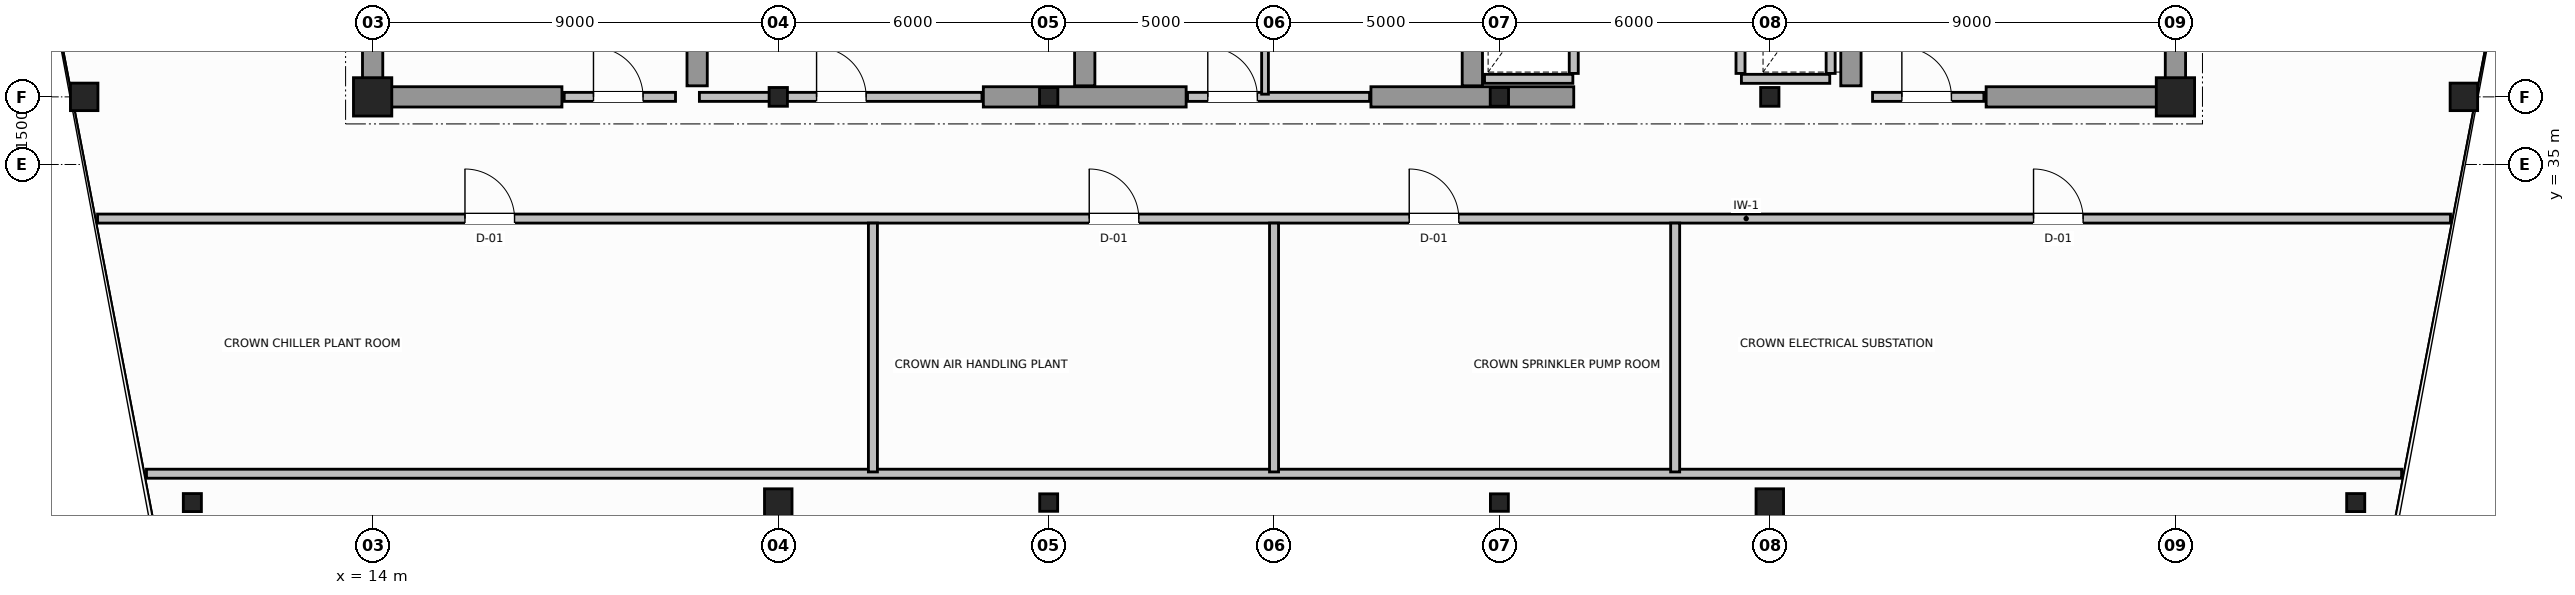
"""IFC4 building model, lengths in metres.
Left out: names, types, materials, properties, quantities, classifications, styles, units other than length and angle.
Written with IfcOpenShell. Run it as: python <this file> out.ifc"""

import sys

from ifc_helpers import new_model, si_unit, direction, frame, frame_2d, origin, origin_2d, place, context, subcontext, project, spatial, rectangle, hollow_circle, i_section, extrude, source, transform, mapped, element, fill, save


model = new_model("IFC4")
c1 = context("Model", 3, precision=1e-05, world=origin(), true_north=direction((0.0, 1.0)))
c2 = subcontext(c1, "Body", "Model", "MODEL_VIEW")
j1 = project(units=[si_unit("LENGTHUNIT", "METRE"), si_unit("PLANEANGLEUNIT", "RADIAN")], contexts=[c1])
p1 = place(None, origin())
s1 = spatial("IfcSite", under=j1, at=p1, CompositionType="ELEMENT")
p2 = place(p1, origin())
s2 = spatial("IfcBuilding", under=s1, at=p2, CompositionType="ELEMENT")
p3 = place(p2, frame((0.0, 0.0, 303.8)))
s3 = spatial("IfcBuildingStorey", under=s2, at=p3, CompositionType="ELEMENT", Elevation=303.8)
m1 = source(origin(), c2, "Body", "SweptSolid", [
    extrude(rectangle(XDim=0.85, YDim=0.85, at=origin_2d()), origin(), (0.0, 0.0, 1.0), 4.6),
])
p4 = place(p3, frame((14.0, 36.5, 0.0), z_axis=(0.0, 0.0, 1.0), x_axis=(1.0, 0.0, 0.0)))
e1 = element("IfcColumn", 1, at=p4, inside=s3, PredefinedType="COLUMN", context=c2, shape_type="MappedRepresentation", body=[
    mapped(m1, transform((0.0, 0.0, 0.0), scale=1.0)),
])
m2 = source(origin(), c2, "Body", "SweptSolid", [
    extrude(i_section(OverallWidth=0.406, OverallDepth=0.416, WebThickness=0.03, FlangeThickness=0.042, FilletRadius=0.015, at=origin_2d()), origin(), (0.0, 0.0, 1.0), 4.6),
])
for number, where, z_axis, x_axis in (
    (2, (23.0, 36.5, 0.0), (0.0, 0.0, 1.0), (1.0, 0.0, 0.0)),
    (3, (29.0, 36.5, 0.0), (0.0, 0.0, 1.0), (1.0, 0.0, 0.0)),
    (4, (39.0, 36.5, 0.0), (0.0, 0.0, 1.0), (1.0, 0.0, 0.0)),
    (5, (45.0, 36.5, 0.0), (0.0, 0.0, 1.0), (1.0, 0.0, 0.0)),
):
    element("IfcColumn", number, at=place(p3, frame(where, z_axis=z_axis, x_axis=x_axis)), inside=s3, PredefinedType="COLUMN", context=c2, shape_type="MappedRepresentation", body=[
        mapped(m2, transform((0.0, 0.0, 0.0), scale=1.0)),
    ])
p5 = place(p3, frame((54.0, 36.5, 0.0), z_axis=(0.0, 0.0, 1.0), x_axis=(1.0, 0.0, 0.0)))
e6 = element("IfcColumn", 6, at=p5, inside=s3, PredefinedType="COLUMN", context=c2, shape_type="MappedRepresentation", body=[
    mapped(m1, transform((0.0, 0.0, 0.0), scale=1.0)),
])
m3 = source(origin(), c2, "Body", "SweptSolid", [
    extrude(hollow_circle(Radius=0.305, WallThickness=0.03, at=origin_2d()), origin(), (0.0, 0.0, 1.0), 4.6),
])
for number, where, z_axis, x_axis in (
    (7, (7.6, 36.5, 0.0), (0.0, 0.0, 1.0), (1.0, 0.0, 0.0)),
    (8, (60.4, 36.5, 0.0), (0.0, 0.0, 1.0), (1.0, 0.0, 0.0)),
):
    element("IfcColumn", number, at=place(p3, frame(where, z_axis=z_axis, x_axis=x_axis)), inside=s3, PredefinedType="COLUMN", context=c2, shape_type="MappedRepresentation", body=[
        mapped(m3, transform((0.0, 0.0, 0.0), scale=1.0)),
    ])
m4 = source(origin(), c2, "Body", "SweptSolid", [
    extrude(i_section(OverallWidth=0.401, OverallDepth=0.399, WebThickness=0.025, FlangeThickness=0.035, FilletRadius=0.015, at=origin_2d()), origin(), (0.0, 0.0, 1.0), 4.6),
])
for number, where, z_axis, x_axis in (
    (9, (10.0, 27.5, 0.0), (0.0, 0.0, 1.0), (1.0, 0.0, 0.0)),
    (10, (58.0, 27.5, 0.0), (0.0, 0.0, 1.0), (1.0, 0.0, 0.0)),
):
    element("IfcColumn", number, at=place(p3, frame(where, z_axis=z_axis, x_axis=x_axis)), inside=s3, PredefinedType="COLUMN", context=c2, shape_type="MappedRepresentation", body=[
        mapped(m4, transform((0.0, 0.0, 0.0), scale=1.0)),
    ])
p6 = place(p3, frame((23.0, 27.5, 0.0), z_axis=(0.0, 0.0, 1.0), x_axis=(1.0, 0.0, 0.0)))
e11 = element("IfcColumn", 11, at=p6, inside=s3, PredefinedType="COLUMN", context=c2, shape_type="MappedRepresentation", body=[
    mapped(m3, transform((0.0, 0.0, 0.0), scale=1.0)),
])
m5 = source(origin(), c2, "Body", "SweptSolid", [
    extrude(i_section(OverallWidth=0.398, OverallDepth=0.387, WebThickness=0.021, FlangeThickness=0.029, FilletRadius=0.015, at=origin_2d()), origin(), (0.0, 0.0, 1.0), 4.6),
])
for number, where, z_axis, x_axis in (
    (12, (29.0, 27.5, 0.0), (0.0, 0.0, 1.0), (1.0, 0.0, 0.0)),
    (13, (39.0, 27.5, 0.0), (0.0, 0.0, 1.0), (1.0, 0.0, 0.0)),
):
    element("IfcColumn", number, at=place(p3, frame(where, z_axis=z_axis, x_axis=x_axis)), inside=s3, PredefinedType="COLUMN", context=c2, shape_type="MappedRepresentation", body=[
        mapped(m5, transform((0.0, 0.0, 0.0), scale=1.0)),
    ])
p7 = place(p3, frame((45.0, 27.5, 0.0), z_axis=(0.0, 0.0, 1.0), x_axis=(1.0, 0.0, 0.0)))
e14 = element("IfcColumn", 14, at=p7, inside=s3, PredefinedType="COLUMN", context=c2, shape_type="MappedRepresentation", body=[
    mapped(m3, transform((0.0, 0.0, 0.0), scale=1.0)),
])
for number, where, z_axis, x_axis in (
    (15, (14.0, 36.5, 0.0), (0.0, 0.0, 1.0), (0.0, 1.0, 0.0)),
    (16, (54.0, 36.5, 0.0), (0.0, 0.0, 1.0), (0.0, 1.0, 0.0)),
):
    element("IfcWall", number, at=place(p3, frame(where, z_axis=z_axis, x_axis=x_axis)), inside=s3, PredefinedType="SHEAR", context=c2, shape_type="SweptSolid", body=[
        extrude(rectangle(XDim=14.5, YDim=0.45, at=frame_2d((7.25, 0.0))), origin(), (0.0, 0.0, 1.0), 4.6),
    ])
p8 = place(p3, frame((14.245, 36.5, 0.0), z_axis=(0.0, 0.0, 1.0), x_axis=(1.0, 0.0, 0.0)))
e17 = element("IfcWall", 17, at=p8, inside=s3, PredefinedType="SHEAR", context=c2, shape_type="SweptSolid", body=[
    extrude(rectangle(XDim=3.955, YDim=0.45, at=frame_2d((1.978, 0.0))), origin(), (0.0, 0.0, 1.0), 3.3),
])
for number, where, z_axis, x_axis in (
    (18, (27.55, 36.5, 0.0), (0.0, 0.0, 1.0), (1.0, 0.0, 0.0)),
    (19, (36.15, 36.5, 0.0), (0.0, 0.0, 1.0), (1.0, 0.0, 0.0)),
):
    element("IfcWall", number, at=place(p3, frame(where, z_axis=z_axis, x_axis=x_axis)), inside=s3, PredefinedType="SHEAR", context=c2, shape_type="SweptSolid", body=[
        extrude(rectangle(XDim=4.5, YDim=0.45, at=frame_2d((2.25, 0.0))), origin(), (0.0, 0.0, 1.0), 4.6),
    ])
p9 = place(p3, frame((49.8, 36.5, 0.0), z_axis=(0.0, 0.0, 1.0), x_axis=(1.0, 0.0, 0.0)))
e20 = element("IfcWall", 20, at=p9, inside=s3, PredefinedType="SHEAR", context=c2, shape_type="SweptSolid", body=[
    extrude(rectangle(XDim=3.955, YDim=0.45, at=frame_2d((1.978, 0.0))), origin(), (0.0, 0.0, 1.0), 3.3),
])
for number, where, z_axis, x_axis in (
    (21, (21.2, 36.745, 0.0), (0.0, 0.0, 1.0), (0.0, 1.0, 0.0)),
    (22, (29.8, 36.745, 0.0), (0.0, 0.0, 1.0), (0.0, 1.0, 0.0)),
    (23, (38.4, 36.745, 0.0), (0.0, 0.0, 1.0), (0.0, 1.0, 0.0)),
    (24, (46.8, 36.745, 0.0), (0.0, 0.0, 1.0), (0.0, 1.0, 0.0)),
):
    element("IfcWall", number, at=place(p3, frame(where, z_axis=z_axis, x_axis=x_axis)), inside=s3, PredefinedType="SHEAR", context=c2, shape_type="SweptSolid", body=[
        extrude(rectangle(XDim=9.455, YDim=0.45, at=frame_2d((4.728, 0.0))), origin(), (0.0, 0.0, 1.0), 4.6),
    ])
p10 = place(p3, frame((18.25, 36.5, 0.0), z_axis=(0.0, 0.0, 1.0), x_axis=(1.0, 0.0, 0.0)))
e25 = element("IfcWall", 25, at=p10, inside=s3, PredefinedType="SOLIDWALL", context=c2, shape_type="SweptSolid", body=[
    extrude(rectangle(XDim=2.47, YDim=0.2, at=frame_2d((1.235, 0.0))), origin(), (0.0, 0.0, 1.0), 3.29),
])
p11 = place(p10, frame((0.65, 0.0, 0.0)))
e26 = element("IfcOpeningElement", 26, at=p11, cuts=e25, PredefinedType="OPENING", context=c2, shape_type="SweptSolid", body=[
    extrude(rectangle(XDim=1.1, YDim=2.15, at=frame_2d((0.55, 1.075))), frame((0.0, 0.11, 0.0), z_axis=(0.0, -1.0, 0.0), x_axis=(1.0, 0.0, 0.0)), (0.0, 0.0, 1.0), 0.22),
])
p12 = place(p3, frame((47.28, 36.5, 0.0), z_axis=(0.0, 0.0, 1.0), x_axis=(1.0, 0.0, 0.0)))
e27 = element("IfcWall", 27, at=p12, inside=s3, PredefinedType="SOLIDWALL", context=c2, shape_type="SweptSolid", body=[
    extrude(rectangle(XDim=2.47, YDim=0.2, at=frame_2d((1.235, 0.0))), origin(), (0.0, 0.0, 1.0), 3.29),
])
p13 = place(p12, frame((0.65, 0.0, 0.0)))
e28 = element("IfcOpeningElement", 28, at=p13, cuts=e27, PredefinedType="OPENING", context=c2, shape_type="SweptSolid", body=[
    extrude(rectangle(XDim=1.1, YDim=2.15, at=frame_2d((0.55, 1.075))), frame((0.0, 0.11, 0.0), z_axis=(0.0, -1.0, 0.0), x_axis=(1.0, 0.0, 0.0)), (0.0, 0.0, 1.0), 0.22),
])
p14 = place(p3, frame((38.67, 36.9, 0.0), z_axis=(0.0, 0.0, 1.0), x_axis=(1.0, 0.0, 0.0)))
e29 = element("IfcWall", 29, at=p14, inside=s3, PredefinedType="SOLIDWALL", context=c2, shape_type="SweptSolid", body=[
    extrude(rectangle(XDim=1.96, YDim=0.2, at=frame_2d((0.98, 0.0))), origin(), (0.0, 0.0, 1.0), 3.09),
])
p15 = place(p3, frame((40.65, 37.02, 0.0), z_axis=(0.0, 0.0, 1.0), x_axis=(0.0, 1.0, 0.0)))
e30 = element("IfcWall", 30, at=p15, inside=s3, PredefinedType="SOLIDWALL", context=c2, shape_type="SweptSolid", body=[
    extrude(rectangle(XDim=2.56, YDim=0.2, at=frame_2d((1.28, 0.0))), origin(), (0.0, 0.0, 1.0), 4.3),
])
p16 = place(p3, frame((44.37, 36.9, 0.0), z_axis=(0.0, 0.0, 1.0), x_axis=(1.0, 0.0, 0.0)))
e31 = element("IfcWall", 31, at=p16, inside=s3, PredefinedType="SOLIDWALL", context=c2, shape_type="SweptSolid", body=[
    extrude(rectangle(XDim=1.96, YDim=0.2, at=frame_2d((0.98, 0.0))), origin(), (0.0, 0.0, 1.0), 3.09),
])
for number, where, z_axis, x_axis in (
    (32, (44.35, 37.02, 0.0), (0.0, 0.0, 1.0), (0.0, 1.0, 0.0)),
    (33, (46.35, 37.02, 0.0), (0.0, 0.0, 1.0), (0.0, 1.0, 0.0)),
):
    element("IfcWall", number, at=place(p3, frame(where, z_axis=z_axis, x_axis=x_axis)), inside=s3, PredefinedType="SOLIDWALL", context=c2, shape_type="SweptSolid", body=[
        extrude(rectangle(XDim=2.56, YDim=0.2, at=frame_2d((1.28, 0.0))), origin(), (0.0, 0.0, 1.0), 4.3),
    ])
p17 = place(p3, frame((21.25, 36.5, 0.0), z_axis=(0.0, 0.0, 1.0), x_axis=(1.0, 0.0, 0.0)))
e34 = element("IfcWall", 34, at=p17, inside=s3, PredefinedType="SOLIDWALL", context=c2, shape_type="SweptSolid", body=[
    extrude(rectangle(XDim=6.27, YDim=0.2, at=frame_2d((3.135, 0.0))), origin(), (0.0, 0.0, 1.0), 3.09),
])
p18 = place(p17, frame((2.6, 0.0, 0.0)))
e35 = element("IfcOpeningElement", 35, at=p18, cuts=e34, PredefinedType="OPENING", context=c2, shape_type="SweptSolid", body=[
    extrude(rectangle(XDim=1.1, YDim=2.15, at=frame_2d((0.55, 1.075))), frame((0.0, 0.11, 0.0), z_axis=(0.0, -1.0, 0.0), x_axis=(1.0, 0.0, 0.0)), (0.0, 0.0, 1.0), 0.22),
])
p19 = place(p3, frame((32.08, 36.5, 0.0), z_axis=(0.0, 0.0, 1.0), x_axis=(1.0, 0.0, 0.0)))
e36 = element("IfcWall", 36, at=p19, inside=s3, PredefinedType="SOLIDWALL", context=c2, shape_type="SweptSolid", body=[
    extrude(rectangle(XDim=4.04, YDim=0.2, at=frame_2d((2.02, 0.0))), origin(), (0.0, 0.0, 1.0), 3.09),
])
p20 = place(p19, frame((0.45, 0.0, 0.0)))
e37 = element("IfcOpeningElement", 37, at=p20, cuts=e36, PredefinedType="OPENING", context=c2, shape_type="SweptSolid", body=[
    extrude(rectangle(XDim=1.1, YDim=2.15, at=frame_2d((0.55, 1.075))), frame((0.0, 0.11, 0.0), z_axis=(0.0, -1.0, 0.0), x_axis=(1.0, 0.0, 0.0)), (0.0, 0.0, 1.0), 0.22),
])
p21 = place(p3, frame((33.8, 36.56, 0.0), z_axis=(0.0, 0.0, 1.0), x_axis=(0.0, 1.0, 0.0)))
e38 = element("IfcWall", 38, at=p21, inside=s3, PredefinedType="PARTITIONING", context=c2, shape_type="SweptSolid", body=[
    extrude(rectangle(XDim=9.58, YDim=0.15, at=frame_2d((4.79, 0.0))), origin(), (0.0, 0.0, 1.0), 4.3),
])
p22 = place(p21, frame((4.2, 0.0, 0.0)))
e39 = element("IfcOpeningElement", 39, at=p22, cuts=e38, PredefinedType="OPENING", context=c2, shape_type="SweptSolid", body=[
    extrude(rectangle(XDim=0.9, YDim=2.1, at=frame_2d((0.45, 1.05))), frame((0.0, 0.085, 0.0), z_axis=(0.0, -1.0, 0.0), x_axis=(1.0, 0.0, 0.0)), (0.0, 0.0, 1.0), 0.17),
])
p23 = place(p3, frame((7.897, 33.8, 0.0), z_axis=(0.0, 0.0, 1.0), x_axis=(1.0, 0.0, 0.0)))
e40 = element("IfcWall", 40, at=p23, inside=s3, PredefinedType="SOLIDWALL", context=c2, shape_type="SweptSolid", body=[
    extrude(rectangle(XDim=52.207, YDim=0.2, at=frame_2d((26.103, 0.0))), origin(), (0.0, 0.0, 1.0), 4.3),
])
p24 = place(p23, frame((8.152, 0.0, 0.0)))
e41 = element("IfcOpeningElement", 41, at=p24, cuts=e40, PredefinedType="OPENING", context=c2, shape_type="SweptSolid", body=[
    extrude(rectangle(XDim=1.1, YDim=2.15, at=frame_2d((0.55, 1.075))), frame((0.0, 0.11, 0.0), z_axis=(0.0, -1.0, 0.0), x_axis=(1.0, 0.0, 0.0)), (0.0, 0.0, 1.0), 0.22),
])
p25 = place(p23, frame((22.003, 0.0, 0.0)))
e42 = element("IfcOpeningElement", 42, at=p25, cuts=e40, PredefinedType="OPENING", context=c2, shape_type="SweptSolid", body=[
    extrude(rectangle(XDim=1.1, YDim=2.15, at=frame_2d((0.55, 1.075))), frame((0.0, 0.11, 0.0), z_axis=(0.0, -1.0, 0.0), x_axis=(1.0, 0.0, 0.0)), (0.0, 0.0, 1.0), 0.22),
])
p26 = place(p23, frame((29.103, 0.0, 0.0)))
e43 = element("IfcOpeningElement", 43, at=p26, cuts=e40, PredefinedType="OPENING", context=c2, shape_type="SweptSolid", body=[
    extrude(rectangle(XDim=1.1, YDim=2.15, at=frame_2d((0.55, 1.075))), frame((0.0, 0.11, 0.0), z_axis=(0.0, -1.0, 0.0), x_axis=(1.0, 0.0, 0.0)), (0.0, 0.0, 1.0), 0.22),
])
p27 = place(p23, frame((42.955, 0.0, 0.0)))
e44 = element("IfcOpeningElement", 44, at=p27, cuts=e40, PredefinedType="OPENING", context=c2, shape_type="SweptSolid", body=[
    extrude(rectangle(XDim=1.1, YDim=2.15, at=frame_2d((0.55, 1.075))), frame((0.0, 0.11, 0.0), z_axis=(0.0, -1.0, 0.0), x_axis=(1.0, 0.0, 0.0)), (0.0, 0.0, 1.0), 0.22),
])
p28 = place(p3, frame((8.982, 28.14, 0.0), z_axis=(0.0, 0.0, 1.0), x_axis=(1.0, 0.0, 0.0)))
e45 = element("IfcWall", 45, at=p28, inside=s3, PredefinedType="SOLIDWALL", context=c2, shape_type="SweptSolid", body=[
    extrude(rectangle(XDim=50.036, YDim=0.2, at=frame_2d((25.018, 0.0))), origin(), (0.0, 0.0, 1.0), 4.3),
])
for number, where, z_axis, x_axis in (
    (46, (25.1, 28.18, 0.0), (0.0, 0.0, 1.0), (0.0, 1.0, 0.0)),
    (47, (34.0, 28.18, 0.0), (0.0, 0.0, 1.0), (0.0, 1.0, 0.0)),
    (48, (42.9, 28.18, 0.0), (0.0, 0.0, 1.0), (0.0, 1.0, 0.0)),
):
    element("IfcWall", number, at=place(p3, frame(where, z_axis=z_axis, x_axis=x_axis)), inside=s3, PredefinedType="SOLIDWALL", context=c2, shape_type="SweptSolid", body=[
        extrude(rectangle(XDim=5.52, YDim=0.2, at=frame_2d((2.76, 0.0))), origin(), (0.0, 0.0, 1.0), 4.3),
    ])
m6 = source(origin(), c2, "Body", "SweptSolid", [
    extrude(rectangle(XDim=1.1, YDim=2.15, at=frame_2d((0.55, 1.075))), frame((0.0, 0.025, 0.0), z_axis=(0.0, -1.0, 0.0), x_axis=(1.0, 0.0, 0.0)), (0.0, 0.0, 1.0), 0.05),
])
p29 = place(p11, origin())
e49 = element("IfcDoor", 49, at=p29, inside=s3, OperationType="SINGLE_SWING_RIGHT", PredefinedType="DOOR", context=c2, shape_type="MappedRepresentation", body=[
    mapped(m6, transform((0.0, 0.0, 0.0), scale=1.0)),
])
fill(e26, e49)
p30 = place(p13, origin())
e50 = element("IfcDoor", 50, at=p30, inside=s3, OperationType="SINGLE_SWING_LEFT", PredefinedType="DOOR", context=c2, shape_type="MappedRepresentation", body=[
    mapped(m6, transform((0.0, 0.0, 0.0), scale=1.0)),
])
fill(e28, e50)
p31 = place(p18, origin())
e51 = element("IfcDoor", 51, at=p31, inside=s3, OperationType="SINGLE_SWING_LEFT", PredefinedType="DOOR", context=c2, shape_type="MappedRepresentation", body=[
    mapped(m6, transform((0.0, 0.0, 0.0), scale=1.0)),
])
fill(e35, e51)
p32 = place(p20, origin())
e52 = element("IfcDoor", 52, at=p32, inside=s3, OperationType="SINGLE_SWING_LEFT", PredefinedType="DOOR", context=c2, shape_type="MappedRepresentation", body=[
    mapped(m6, transform((0.0, 0.0, 0.0), scale=1.0)),
])
fill(e37, e52)
p33 = place(p24, origin())
e53 = element("IfcDoor", 53, at=p33, inside=s3, OperationType="SINGLE_SWING_LEFT", PredefinedType="DOOR", context=c2, shape_type="MappedRepresentation", body=[
    mapped(m6, transform((0.0, 0.0, 0.0), scale=1.0)),
])
fill(e41, e53)
p34 = place(p25, origin())
e54 = element("IfcDoor", 54, at=p34, inside=s3, OperationType="SINGLE_SWING_RIGHT", PredefinedType="DOOR", context=c2, shape_type="MappedRepresentation", body=[
    mapped(m6, transform((0.0, 0.0, 0.0), scale=1.0)),
])
fill(e42, e54)
p35 = place(p26, origin())
e55 = element("IfcDoor", 55, at=p35, inside=s3, OperationType="SINGLE_SWING_LEFT", PredefinedType="DOOR", context=c2, shape_type="MappedRepresentation", body=[
    mapped(m6, transform((0.0, 0.0, 0.0), scale=1.0)),
])
fill(e43, e55)
p36 = place(p27, origin())
e56 = element("IfcDoor", 56, at=p36, inside=s3, OperationType="SINGLE_SWING_RIGHT", PredefinedType="DOOR", context=c2, shape_type="MappedRepresentation", body=[
    mapped(m6, transform((0.0, 0.0, 0.0), scale=1.0)),
])
fill(e44, e56)
save(model, sys.argv[1])
